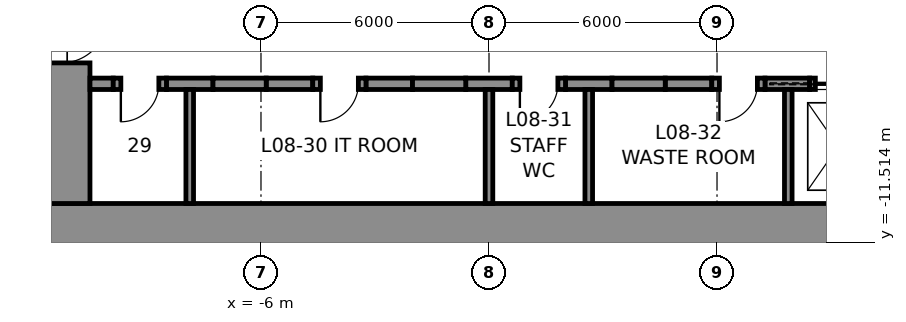
"""IFC4 building model, lengths in metres.
Left out: names, types, materials, properties, quantities, classifications, styles, units other than length and angle.
Written with IfcOpenShell. Run it as: python <this file> out.ifc"""

import sys

from ifc_helpers import new_model, si_unit, direction, frame, frame_2d, origin, place, context, subcontext, project, spatial, rectangle, extrude, element, fill, save


model = new_model("IFC4")
c1 = context("Model", 3, precision=1e-05, world=origin(), true_north=direction((0.0, 1.0)))
c2 = subcontext(c1, "Body", "Model", "MODEL_VIEW")
j1 = project(units=[si_unit("LENGTHUNIT", "METRE"), si_unit("PLANEANGLEUNIT", "RADIAN")], contexts=[c1])
p1 = place(None, origin())
s1 = spatial("IfcSite", under=j1, at=p1, CompositionType="ELEMENT")
p2 = place(p1, origin())
s2 = spatial("IfcBuilding", under=s1, at=p2, CompositionType="ELEMENT")
p3 = place(p2, frame((0.0, 0.0, 43.0)))
s3 = spatial("IfcBuildingStorey", under=s2, at=p3, CompositionType="ELEMENT", Elevation=43.0)
p4 = place(p3, frame((12.0, -11.25, 0.0), z_axis=(0.0, 0.0, 1.0), x_axis=(-1.0, 0.0, 0.0)))
e1 = element("IfcWall", 1, at=p4, inside=s3, PredefinedType="SHEAR", context=c2, shape_type="SweptSolid", body=[
    extrude(rectangle(XDim=24.0, YDim=1.5, at=frame_2d((12.0, 0.0))), origin(), (0.0, 0.0, 1.0), 5.5),
])
p5 = place(p3, frame((-11.25, -10.5, 0.0), z_axis=(0.0, 0.0, 1.0), x_axis=(0.0, 1.0, 0.0)))
e2 = element("IfcWall", 2, at=p5, inside=s3, PredefinedType="SHEAR", context=c2, shape_type="SweptSolid", body=[
    extrude(rectangle(XDim=21.0, YDim=1.5, at=frame_2d((10.5, 0.0))), origin(), (0.0, 0.0, 1.0), 5.5),
])
p6 = place(p5, frame((16.1, 0.0, 0.0)))
e3 = element("IfcOpeningElement", 3, at=p6, cuts=e2, PredefinedType="OPENING", context=c2, shape_type="SweptSolid", body=[
    extrude(rectangle(XDim=1.2, YDim=2.3, at=frame_2d((0.6, 1.15))), frame((0.0, 0.76, 0.0), z_axis=(0.0, -1.0, 0.0), x_axis=(1.0, 0.0, 0.0)), (0.0, 0.0, 1.0), 1.52),
])
p7 = place(p5, frame((3.7, 0.0, 0.0)))
e4 = element("IfcOpeningElement", 4, at=p7, cuts=e2, PredefinedType="OPENING", context=c2, shape_type="SweptSolid", body=[
    extrude(rectangle(XDim=1.2, YDim=2.3, at=frame_2d((0.6, 1.15))), frame((0.0, 0.76, 0.0), z_axis=(0.0, -1.0, 0.0), x_axis=(1.0, 0.0, 0.0)), (0.0, 0.0, 1.0), 1.52),
])
p8 = place(p3, frame((-10.5, -7.35, 0.0), z_axis=(0.0, 0.0, 1.0), x_axis=(1.0, 0.0, 0.0)))
e5 = element("IfcWall", 5, at=p8, inside=s3, PredefinedType="SHEAR", context=c2, shape_type="SweptSolid", body=[
    extrude(rectangle(XDim=0.613, YDim=0.3, at=frame_2d((0.306, 0.0))), origin(), (0.0, 0.0, 1.0), 5.5),
])
for number, where, z_axis, x_axis in (
    (6, (-8.488, -7.35, 0.0), (0.0, 0.0, 1.0), (1.0, 0.0, 0.0)),
    (7, (-5.863, -7.35, 0.0), (0.0, 0.0, 1.0), (1.0, 0.0, 0.0)),
    (8, (-3.238, -7.35, 0.0), (0.0, 0.0, 1.0), (1.0, 0.0, 0.0)),
    (9, (-0.613, -7.35, 0.0), (0.0, 0.0, 1.0), (1.0, 0.0, 0.0)),
    (10, (2.012, -7.35, 0.0), (0.0, 0.0, 1.0), (1.0, 0.0, 0.0)),
    (11, (4.637, -7.35, 0.0), (0.0, 0.0, 1.0), (1.0, 0.0, 0.0)),
):
    element("IfcWall", number, at=place(p3, frame(where, z_axis=z_axis, x_axis=x_axis)), inside=s3, PredefinedType="SHEAR", context=c2, shape_type="SweptSolid", body=[
        extrude(rectangle(XDim=1.225, YDim=0.3, at=frame_2d((0.613, 0.0))), origin(), (0.0, 0.0, 1.0), 5.5),
    ])
p9 = place(p3, frame((7.262, -7.35, 0.0), z_axis=(0.0, 0.0, 1.0), x_axis=(1.0, 0.0, 0.0)))
e12 = element("IfcWall", 12, at=p9, inside=s3, PredefinedType="SHEAR", context=c2, shape_type="SweptSolid", body=[
    extrude(rectangle(XDim=1.175, YDim=0.3, at=frame_2d((0.587, 0.0))), origin(), (0.0, 0.0, 1.0), 5.5),
])
p10 = place(p3, frame((-9.887, -7.35, 0.0), z_axis=(0.0, 0.0, 1.0), x_axis=(1.0, 0.0, 0.0)))
e13 = element("IfcWall", 13, at=p10, inside=s3, PredefinedType="PARTITIONING", context=c2, shape_type="SweptSolid", body=[
    extrude(rectangle(XDim=1.4, YDim=0.3, at=frame_2d((0.7, 0.0))), origin(), (0.0, 0.0, 1.0), 5.5),
])
p11 = place(p10, frame((0.2, 0.0, 0.0)))
e14 = element("IfcOpeningElement", 14, at=p11, cuts=e13, PredefinedType="OPENING", context=c2, shape_type="SweptSolid", body=[
    extrude(rectangle(XDim=1.0, YDim=2.3, at=frame_2d((0.5, 1.15))), frame((0.0, 0.16, 0.0), z_axis=(0.0, -1.0, 0.0), x_axis=(1.0, 0.0, 0.0)), (0.0, 0.0, 1.0), 0.32),
])
p12 = place(p3, frame((-7.262, -7.35, 0.0), z_axis=(0.0, 0.0, 1.0), x_axis=(1.0, 0.0, 0.0)))
e15 = element("IfcWall", 15, at=p12, inside=s3, PredefinedType="PARTITIONING", context=c2, shape_type="SweptSolid", body=[
    extrude(rectangle(XDim=1.4, YDim=0.3, at=frame_2d((0.7, 0.0))), origin(), (0.0, 0.0, 1.0), 5.5),
])
p13 = place(p3, frame((-4.637, -7.35, 0.0), z_axis=(0.0, 0.0, 1.0), x_axis=(1.0, 0.0, 0.0)))
e16 = element("IfcWall", 16, at=p13, inside=s3, PredefinedType="PARTITIONING", context=c2, shape_type="SweptSolid", body=[
    extrude(rectangle(XDim=1.4, YDim=0.3, at=frame_2d((0.7, 0.0))), origin(), (0.0, 0.0, 1.0), 5.5),
])
p14 = place(p13, frame((0.2, 0.0, 0.0)))
e17 = element("IfcOpeningElement", 17, at=p14, cuts=e16, PredefinedType="OPENING", context=c2, shape_type="SweptSolid", body=[
    extrude(rectangle(XDim=1.0, YDim=2.3, at=frame_2d((0.5, 1.15))), frame((0.0, 0.16, 0.0), z_axis=(0.0, -1.0, 0.0), x_axis=(1.0, 0.0, 0.0)), (0.0, 0.0, 1.0), 0.32),
])
p15 = place(p3, frame((-2.012, -7.35, 0.0), z_axis=(0.0, 0.0, 1.0), x_axis=(1.0, 0.0, 0.0)))
e18 = element("IfcWall", 18, at=p15, inside=s3, PredefinedType="PARTITIONING", context=c2, shape_type="SweptSolid", body=[
    extrude(rectangle(XDim=1.4, YDim=0.3, at=frame_2d((0.7, 0.0))), origin(), (0.0, 0.0, 1.0), 5.5),
])
p16 = place(p3, frame((0.613, -7.35, 0.0), z_axis=(0.0, 0.0, 1.0), x_axis=(1.0, 0.0, 0.0)))
e19 = element("IfcWall", 19, at=p16, inside=s3, PredefinedType="PARTITIONING", context=c2, shape_type="SweptSolid", body=[
    extrude(rectangle(XDim=1.4, YDim=0.3, at=frame_2d((0.7, 0.0))), origin(), (0.0, 0.0, 1.0), 5.5),
])
p17 = place(p16, frame((0.2, 0.0, 0.0)))
e20 = element("IfcOpeningElement", 20, at=p17, cuts=e19, PredefinedType="OPENING", context=c2, shape_type="SweptSolid", body=[
    extrude(rectangle(XDim=1.0, YDim=2.3, at=frame_2d((0.5, 1.15))), frame((0.0, 0.16, 0.0), z_axis=(0.0, -1.0, 0.0), x_axis=(1.0, 0.0, 0.0)), (0.0, 0.0, 1.0), 0.32),
])
p18 = place(p3, frame((3.238, -7.35, 0.0), z_axis=(0.0, 0.0, 1.0), x_axis=(1.0, 0.0, 0.0)))
e21 = element("IfcWall", 21, at=p18, inside=s3, PredefinedType="PARTITIONING", context=c2, shape_type="SweptSolid", body=[
    extrude(rectangle(XDim=1.4, YDim=0.3, at=frame_2d((0.7, 0.0))), origin(), (0.0, 0.0, 1.0), 5.5),
])
p19 = place(p3, frame((5.863, -7.35, 0.0), z_axis=(0.0, 0.0, 1.0), x_axis=(1.0, 0.0, 0.0)))
e22 = element("IfcWall", 22, at=p19, inside=s3, PredefinedType="PARTITIONING", context=c2, shape_type="SweptSolid", body=[
    extrude(rectangle(XDim=1.4, YDim=0.3, at=frame_2d((0.7, 0.0))), origin(), (0.0, 0.0, 1.0), 5.5),
])
p20 = place(p19, frame((0.2, 0.0, 0.0)))
e23 = element("IfcOpeningElement", 23, at=p20, cuts=e22, PredefinedType="OPENING", context=c2, shape_type="SweptSolid", body=[
    extrude(rectangle(XDim=1.0, YDim=2.3, at=frame_2d((0.5, 1.15))), frame((0.0, 0.16, 0.0), z_axis=(0.0, -1.0, 0.0), x_axis=(1.0, 0.0, 0.0)), (0.0, 0.0, 1.0), 0.32),
])
p21 = place(p3, frame((8.438, -7.35, 0.0), z_axis=(0.0, 0.0, 1.0), x_axis=(1.0, 0.0, 0.0)))
e24 = element("IfcWall", 24, at=p21, inside=s3, PredefinedType="PARTITIONING", context=c2, shape_type="SweptSolid", body=[
    extrude(rectangle(XDim=1.5, YDim=0.3, at=frame_2d((0.75, 0.0))), origin(), (0.0, 0.0, 1.0), 5.5),
])
p22 = place(p21, frame((0.15, 0.0, 0.0)))
e25 = element("IfcOpeningElement", 25, at=p22, cuts=e24, PredefinedType="OPENING", context=c2, shape_type="SweptSolid", body=[
    extrude(rectangle(XDim=1.2, YDim=2.3, at=frame_2d((0.6, 1.15))), frame((0.0, 0.16, 0.0), z_axis=(0.0, -1.0, 0.0), x_axis=(1.0, 0.0, 0.0)), (0.0, 0.0, 1.0), 0.32),
])
for number, where, z_axis, x_axis in (
    (26, (-7.875, -10.5, 0.0), (0.0, 0.0, 1.0), (0.0, 1.0, 0.0)),
    (27, (0.0, -10.5, 0.0), (0.0, 0.0, 1.0), (0.0, 1.0, 0.0)),
    (28, (2.625, -10.5, 0.0), (0.0, 0.0, 1.0), (0.0, 1.0, 0.0)),
    (29, (7.875, -10.5, 0.0), (0.0, 0.0, 1.0), (0.0, 1.0, 0.0)),
):
    element("IfcWall", number, at=place(p3, frame(where, z_axis=z_axis, x_axis=x_axis)), inside=s3, PredefinedType="PARTITIONING", context=c2, shape_type="SweptSolid", body=[
        extrude(rectangle(XDim=3.0, YDim=0.2, at=frame_2d((1.5, 0.0))), origin(), (0.0, 0.0, 1.0), 5.5),
    ])
p23 = place(p11, frame((1.0, 0.0, 0.0), z_axis=(0.0, 0.0, 1.0), x_axis=(-1.0, 0.0, 0.0)))
e30 = element("IfcDoor", 30, at=p23, inside=s3, OperationType="SINGLE_SWING_RIGHT", PredefinedType="DOOR", context=c2, shape_type="SweptSolid", body=[
    extrude(rectangle(XDim=1.0, YDim=2.3, at=frame_2d((0.5, 1.15))), frame((0.0, 0.025, 0.0), z_axis=(0.0, -1.0, 0.0), x_axis=(1.0, 0.0, 0.0)), (0.0, 0.0, 1.0), 0.05),
])
fill(e14, e30)
p24 = place(p14, frame((1.0, 0.0, 0.0), z_axis=(0.0, 0.0, 1.0), x_axis=(-1.0, 0.0, 0.0)))
e31 = element("IfcDoor", 31, at=p24, inside=s3, OperationType="SINGLE_SWING_RIGHT", PredefinedType="DOOR", context=c2, shape_type="SweptSolid", body=[
    extrude(rectangle(XDim=1.0, YDim=2.3, at=frame_2d((0.5, 1.15))), frame((0.0, 0.025, 0.0), z_axis=(0.0, -1.0, 0.0), x_axis=(1.0, 0.0, 0.0)), (0.0, 0.0, 1.0), 0.05),
])
fill(e17, e31)
p25 = place(p17, frame((1.0, 0.0, 0.0), z_axis=(0.0, 0.0, 1.0), x_axis=(-1.0, 0.0, 0.0)))
e32 = element("IfcDoor", 32, at=p25, inside=s3, OperationType="SINGLE_SWING_RIGHT", PredefinedType="DOOR", context=c2, shape_type="SweptSolid", body=[
    extrude(rectangle(XDim=1.0, YDim=2.3, at=frame_2d((0.5, 1.15))), frame((0.0, 0.025, 0.0), z_axis=(0.0, -1.0, 0.0), x_axis=(1.0, 0.0, 0.0)), (0.0, 0.0, 1.0), 0.05),
])
fill(e20, e32)
p26 = place(p20, frame((1.0, 0.0, 0.0), z_axis=(0.0, 0.0, 1.0), x_axis=(-1.0, 0.0, 0.0)))
e33 = element("IfcDoor", 33, at=p26, inside=s3, OperationType="SINGLE_SWING_RIGHT", PredefinedType="DOOR", context=c2, shape_type="SweptSolid", body=[
    extrude(rectangle(XDim=1.0, YDim=2.3, at=frame_2d((0.5, 1.15))), frame((0.0, 0.025, 0.0), z_axis=(0.0, -1.0, 0.0), x_axis=(1.0, 0.0, 0.0)), (0.0, 0.0, 1.0), 0.05),
])
fill(e23, e33)
p27 = place(p7, frame((1.2, 0.0, 0.0), z_axis=(0.0, 0.0, 1.0), x_axis=(-1.0, 0.0, 0.0)))
e34 = element("IfcDoor", 34, at=p27, inside=s3, OperationType="SINGLE_SWING_LEFT", PredefinedType="DOOR", context=c2, shape_type="SweptSolid", body=[
    extrude(rectangle(XDim=1.2, YDim=2.3, at=frame_2d((0.6, 1.15))), frame((0.0, 0.025, 0.0), z_axis=(0.0, -1.0, 0.0), x_axis=(1.0, 0.0, 0.0)), (0.0, 0.0, 1.0), 0.05),
])
fill(e4, e34)
p28 = place(p22, origin())
e35 = element("IfcDoor", 35, at=p28, inside=s3, OperationType="SLIDING_TO_LEFT", PredefinedType="DOOR", context=c2, shape_type="SweptSolid", body=[
    extrude(rectangle(XDim=1.2, YDim=2.3, at=frame_2d((0.6, 1.15))), frame((0.0, 0.025, 0.0), z_axis=(0.0, -1.0, 0.0), x_axis=(1.0, 0.0, 0.0)), (0.0, 0.0, 1.0), 0.05),
])
fill(e25, e35)
save(model, sys.argv[1])
